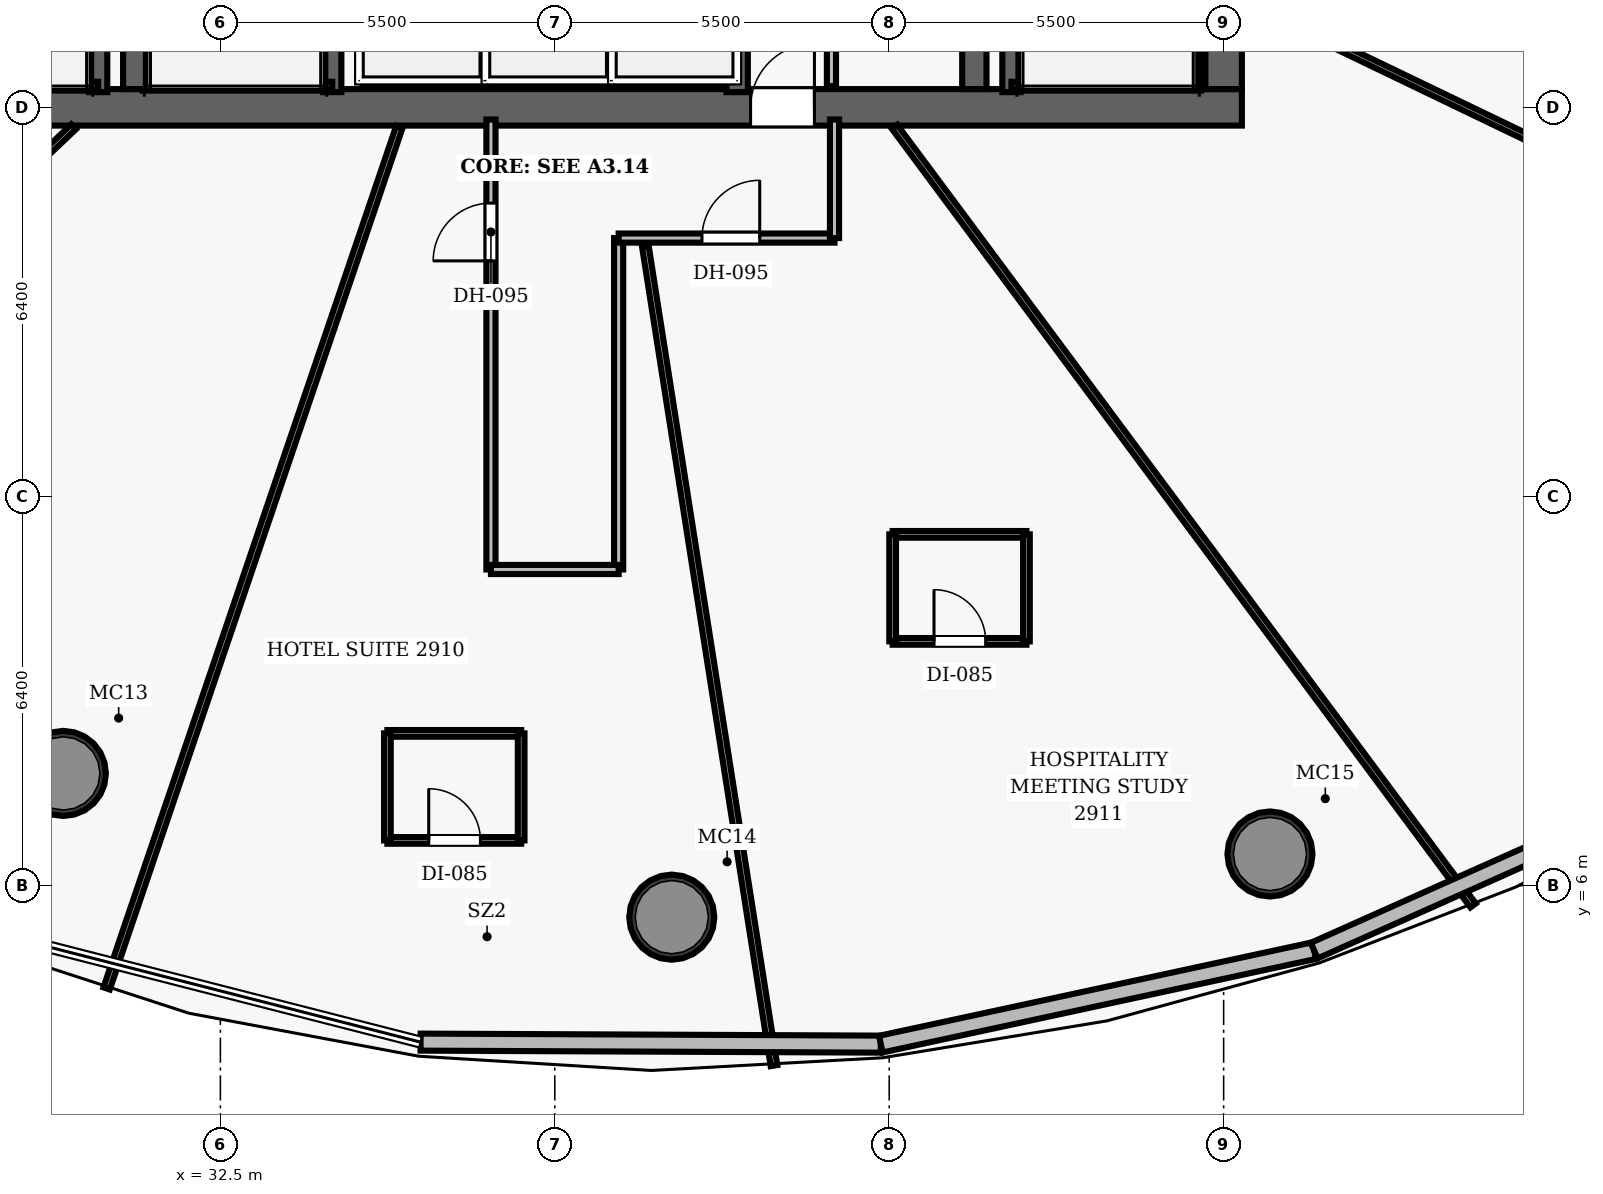
"""IFC4 building model, lengths in metres.
Left out: names, types, materials, properties, quantities, classifications, styles, units other than length and angle.
Written with IfcOpenShell. Run it as: python <this file> out.ifc"""

import sys

from ifc_helpers import new_model, si_unit, direction, frame, frame_2d, origin, origin_2d, place, context, subcontext, project, spatial, rectangle, hollow_circle, extrude, element, fill, save


model = new_model("IFC4")
c1 = context("Model", 3, precision=1e-05, world=origin(), true_north=direction((0.0, 1.0)))
c2 = subcontext(c1, "Body", "Model", "MODEL_VIEW")
j1 = project(units=[si_unit("LENGTHUNIT", "METRE"), si_unit("PLANEANGLEUNIT", "RADIAN")], contexts=[c1])
p1 = place(None, origin())
s1 = spatial("IfcSite", under=j1, at=p1, CompositionType="ELEMENT")
p2 = place(p1, origin())
s2 = spatial("IfcBuilding", under=s1, at=p2, CompositionType="ELEMENT")
p3 = place(p2, frame((0.0, 0.0, 120.3)))
s3 = spatial("IfcBuildingStorey", under=s2, at=p3, CompositionType="ELEMENT", Elevation=120.3)
p4 = place(p3, frame((26.7, 18.8, 0.0), z_axis=(0.0, 0.0, 1.0), x_axis=(1.0, 0.0, 0.0)))
e1 = element("IfcWall", 1, at=p4, inside=s3, PredefinedType="SHEAR", context=c2, shape_type="SweptSolid", body=[
    extrude(rectangle(XDim=22.6, YDim=0.6, at=frame_2d((11.3, 0.0))), origin(), (0.0, 0.0, 1.0), 3.5),
])
p5 = place(p4, frame((14.52, 0.0, 0.0)))
e2 = element("IfcOpeningElement", 2, at=p5, cuts=e1, PredefinedType="OPENING", context=c2, shape_type="SweptSolid", body=[
    extrude(rectangle(XDim=1.05, YDim=2.15, at=frame_2d((0.525, 1.075))), frame((0.0, 0.31, 0.0), z_axis=(0.0, -1.0, 0.0), x_axis=(1.0, 0.0, 0.0)), (0.0, 0.0, 1.0), 0.62),
])
p6 = place(p3, frame((49.0, 19.1, 0.0), z_axis=(0.0, 0.0, 1.0), x_axis=(0.0, 1.0, 0.0)))
e3 = element("IfcWall", 3, at=p6, inside=s3, PredefinedType="SHEAR", context=c2, shape_type="SweptSolid", body=[
    extrude(rectangle(XDim=13.8, YDim=0.6, at=frame_2d((6.9, 0.0))), origin(), (0.0, 0.0, 1.0), 3.5),
])
p7 = place(p6, frame((8.2, 0.0, 0.0)))
e4 = element("IfcOpeningElement", 4, at=p7, cuts=e3, PredefinedType="OPENING", context=c2, shape_type="SweptSolid", body=[
    extrude(rectangle(XDim=1.05, YDim=2.15, at=frame_2d((0.525, 1.075))), frame((0.0, 0.31, 0.0), z_axis=(0.0, -1.0, 0.0), x_axis=(1.0, 0.0, 0.0)), (0.0, 0.0, 1.0), 0.62),
])
for number, where, z_axis, x_axis in (
    (5, (31.1, 19.1, 0.0), (0.0, 0.0, 1.0), (0.0, 1.0, 0.0)),
    (6, (44.9, 19.1, 0.0), (0.0, 0.0, 1.0), (0.0, 1.0, 0.0)),
):
    element("IfcWall", number, at=place(p3, frame(where, z_axis=z_axis, x_axis=x_axis)), inside=s3, PredefinedType="SHEAR", context=c2, shape_type="SweptSolid", body=[
        extrude(rectangle(XDim=13.8, YDim=0.4, at=frame_2d((6.9, 0.0))), origin(), (0.0, 0.0, 1.0), 3.5),
    ])
for number, where, z_axis, x_axis in (
    (7, (29.917, 7.846, 0.0), (0.0, 0.0, 1.0), (1.0, 0.0, 0.0)),
    (8, (39.924, 5.483, 0.0), (0.0, 0.0, 1.0), (1.0, 0.0, 0.0)),
    (9, (49.762, 6.521, 0.0), (0.0, 0.0, 1.0), (1.0, 0.0, 0.0)),
):
    element("IfcColumn", number, at=place(p3, frame(where, z_axis=z_axis, x_axis=x_axis)), inside=s3, PredefinedType="COLUMN", context=c2, shape_type="SweptSolid", body=[
        extrude(hollow_circle(Radius=0.7, WallThickness=0.055, at=origin_2d()), origin(), (0.0, 0.0, 1.0), 3.5),
    ])
p8 = place(p3, frame((30.49, 19.05, 0.0), z_axis=(0.0, 0.0, 1.0), x_axis=(0.0, 1.0, 0.0)))
e10 = element("IfcWall", 10, at=p8, inside=s3, PredefinedType="SHEAR", context=c2, shape_type="SweptSolid", body=[
    extrude(rectangle(XDim=7.5, YDim=0.3, at=frame_2d((3.75, 0.0))), origin(), (0.0, 0.0, 1.0), 3.5),
])
p9 = place(p3, frame((27.395, 19.16, 0.0), z_axis=(0.0, 0.0, 1.0), x_axis=(1.0, 0.0, 0.0)))
e11 = element("IfcWall", 11, at=p9, inside=s3, PredefinedType="SHEAR", context=c2, shape_type="SweptSolid", body=[
    extrude(rectangle(XDim=3.095, YDim=0.12, at=frame_2d((1.547, 0.0))), origin(), (0.0, 0.0, 1.0), 3.5),
])
p10 = place(p3, frame((45.51, 19.05, 0.0), z_axis=(0.0, 0.0, 1.0), x_axis=(0.0, 1.0, 0.0)))
e12 = element("IfcWall", 12, at=p10, inside=s3, PredefinedType="SHEAR", context=c2, shape_type="SweptSolid", body=[
    extrude(rectangle(XDim=7.5, YDim=0.3, at=frame_2d((3.75, 0.0))), origin(), (0.0, 0.0, 1.0), 3.5),
])
p11 = place(p3, frame((48.605, 19.1, 0.0), z_axis=(0.0, 0.0, 1.0), x_axis=(0.0, 1.0, 0.0)))
e13 = element("IfcWall", 13, at=p11, inside=s3, PredefinedType="SHEAR", context=c2, shape_type="SweptSolid", body=[
    extrude(rectangle(XDim=7.45, YDim=0.12, at=frame_2d((3.725, 0.0))), origin(), (0.0, 0.0, 1.0), 3.5),
])
p12 = place(p3, frame((45.51, 19.16, 0.0), z_axis=(0.0, 0.0, 1.0), x_axis=(1.0, 0.0, 0.0)))
e14 = element("IfcWall", 14, at=p12, inside=s3, PredefinedType="SHEAR", context=c2, shape_type="SweptSolid", body=[
    extrude(rectangle(XDim=3.095, YDim=0.12, at=frame_2d((1.547, 0.0))), origin(), (0.0, 0.0, 1.0), 3.5),
])
p13 = place(p3, frame((34.34, 19.05, 0.0), z_axis=(0.0, 0.0, 1.0), x_axis=(0.0, 1.0, 0.0)))
e15 = element("IfcWall", 15, at=p13, inside=s3, PredefinedType="SHEAR", context=c2, shape_type="SweptSolid", body=[
    extrude(rectangle(XDim=7.5, YDim=0.3, at=frame_2d((3.75, 0.0))), origin(), (0.0, 0.0, 1.0), 3.5),
])
p14 = place(p3, frame((31.3, 19.16, 0.0), z_axis=(0.0, 0.0, 1.0), x_axis=(1.0, 0.0, 0.0)))
e16 = element("IfcWall", 16, at=p14, inside=s3, PredefinedType="SHEAR", context=c2, shape_type="SweptSolid", body=[
    extrude(rectangle(XDim=3.04, YDim=0.12, at=frame_2d((1.52, 0.0))), origin(), (0.0, 0.0, 1.0), 3.5),
])
p15 = place(p3, frame((41.0, 19.05, 0.0), z_axis=(0.0, 0.0, 1.0), x_axis=(0.0, 1.0, 0.0)))
e17 = element("IfcWall", 17, at=p15, inside=s3, PredefinedType="SHEAR", context=c2, shape_type="SweptSolid", body=[
    extrude(rectangle(XDim=2.08, YDim=0.35, at=frame_2d((1.04, 0.0))), origin(), (0.0, 0.0, 1.0), 2.675),
])
p16 = place(p3, frame((42.55, 19.15, 0.0), z_axis=(0.0, 0.0, 1.0), x_axis=(0.0, 1.0, 0.0)))
e18 = element("IfcWall", 18, at=p16, inside=s3, PredefinedType="PARTITIONING", context=c2, shape_type="SweptSolid", body=[
    extrude(rectangle(XDim=2.75, YDim=0.15, at=frame_2d((1.375, 0.0))), origin(), (0.0, 0.0, 1.0), 2.675),
])
p17 = place(p16, frame((0.7, 0.0, 0.0)))
e19 = element("IfcOpeningElement", 19, at=p17, cuts=e18, PredefinedType="OPENING", context=c2, shape_type="SweptSolid", body=[
    extrude(rectangle(XDim=0.85, YDim=2.1, at=frame_2d((0.425, 1.05))), frame((0.0, 0.085, 0.0), z_axis=(0.0, -1.0, 0.0), x_axis=(1.0, 0.0, 0.0)), (0.0, 0.0, 1.0), 0.17),
])
p18 = place(p3, frame((36.95, 11.2, 0.0), z_axis=(0.0, 0.0, 1.0), x_axis=(0.0, 1.0, 0.0)))
e20 = element("IfcWall", 20, at=p18, inside=s3, PredefinedType="PARTITIONING", context=c2, shape_type="SweptSolid", body=[
    extrude(rectangle(XDim=7.4, YDim=0.15, at=frame_2d((3.7, 0.0))), origin(), (0.0, 0.0, 1.0), 2.675),
])
p19 = place(p18, frame((5.075, 0.0, 0.0)))
e21 = element("IfcOpeningElement", 21, at=p19, cuts=e20, PredefinedType="OPENING", context=c2, shape_type="SweptSolid", body=[
    extrude(rectangle(XDim=0.95, YDim=2.15, at=frame_2d((0.475, 1.075))), frame((0.0, 0.085, 0.0), z_axis=(0.0, -1.0, 0.0), x_axis=(1.0, 0.0, 0.0)), (0.0, 0.0, 1.0), 0.17),
])
p20 = place(p3, frame((39.05, 11.2, 0.0), z_axis=(0.0, 0.0, 1.0), x_axis=(0.0, 1.0, 0.0)))
e22 = element("IfcWall", 22, at=p20, inside=s3, PredefinedType="PARTITIONING", context=c2, shape_type="SweptSolid", body=[
    extrude(rectangle(XDim=5.45, YDim=0.15, at=frame_2d((2.725, 0.0))), origin(), (0.0, 0.0, 1.0), 2.675),
])
p21 = place(p3, frame((39.05, 16.65, 0.0), z_axis=(0.0, 0.0, 1.0), x_axis=(1.0, 0.0, 0.0)))
e23 = element("IfcWall", 23, at=p21, inside=s3, PredefinedType="PARTITIONING", context=c2, shape_type="SweptSolid", body=[
    extrude(rectangle(XDim=3.55, YDim=0.15, at=frame_2d((1.775, 0.0))), origin(), (0.0, 0.0, 1.0), 2.675),
])
p22 = place(p21, frame((1.37, 0.0, 0.0)))
e24 = element("IfcOpeningElement", 24, at=p22, cuts=e23, PredefinedType="OPENING", context=c2, shape_type="SweptSolid", body=[
    extrude(rectangle(XDim=0.95, YDim=2.15, at=frame_2d((0.475, 1.075))), frame((0.0, 0.085, 0.0), z_axis=(0.0, -1.0, 0.0), x_axis=(1.0, 0.0, 0.0)), (0.0, 0.0, 1.0), 0.17),
])
p23 = place(p3, frame((42.6, 16.65, 0.0), z_axis=(0.0, 0.0, 1.0), x_axis=(0.0, 1.0, 0.0)))
e25 = element("IfcWall", 25, at=p23, inside=s3, PredefinedType="PARTITIONING", context=c2, shape_type="SweptSolid", body=[
    extrude(rectangle(XDim=1.95, YDim=0.15, at=frame_2d((0.975, 0.0))), origin(), (0.0, 0.0, 1.0), 2.675),
])
p24 = place(p3, frame((36.95, 11.2, 0.0), z_axis=(0.0, 0.0, 1.0), x_axis=(1.0, 0.0, 0.0)))
e26 = element("IfcWall", 26, at=p24, inside=s3, PredefinedType="PARTITIONING", context=c2, shape_type="SweptSolid", body=[
    extrude(rectangle(XDim=2.1, YDim=0.15, at=frame_2d((1.05, 0.0))), origin(), (0.0, 0.0, 1.0), 2.675),
])
p25 = place(p3, frame((30.086, 18.48, 0.0), z_axis=(0.0, 0.0, 1.0), x_axis=(-0.724915865707, -0.688837417426, 0.0)))
e27 = element("IfcWall", 27, at=p25, inside=s3, PredefinedType="PARTITIONING", context=c2, shape_type="SweptSolid", body=[
    extrude(rectangle(XDim=12.911, YDim=0.11, at=frame_2d((6.456, 0.0))), origin(), (0.0, 0.0, 1.0), 2.675),
])
p26 = place(p3, frame((35.445, 18.48, 0.0), z_axis=(0.0, 0.0, 1.0), x_axis=(-0.321757380661, -0.946822152249, 0.0)))
e28 = element("IfcWall", 28, at=p26, inside=s3, PredefinedType="PARTITIONING", context=c2, shape_type="SweptSolid", body=[
    extrude(rectangle(XDim=14.966, YDim=0.11, at=frame_2d((7.483, 0.0))), origin(), (0.0, 0.0, 1.0), 2.675),
])
p27 = place(p3, frame((39.49, 16.51, 0.0), z_axis=(0.0, 0.0, 1.0), x_axis=(0.155102778843, -0.987898338897, 0.0)))
e29 = element("IfcWall", 29, at=p27, inside=s3, PredefinedType="PARTITIONING", context=c2, shape_type="SweptSolid", body=[
    extrude(rectangle(XDim=13.635, YDim=0.11, at=frame_2d((6.817, 0.0))), origin(), (0.0, 0.0, 1.0), 2.675),
])
p28 = place(p3, frame((43.588, 18.48, 0.0), z_axis=(0.0, 0.0, 1.0), x_axis=(0.596448533395, -0.802651323434, 0.0)))
e30 = element("IfcWall", 30, at=p28, inside=s3, PredefinedType="PARTITIONING", context=c2, shape_type="SweptSolid", body=[
    extrude(rectangle(XDim=15.953, YDim=0.11, at=frame_2d((7.977, 0.0))), origin(), (0.0, 0.0, 1.0), 2.675),
])
p29 = place(p3, frame((49.32, 20.554, 0.0), z_axis=(0.0, 0.0, 1.0), x_axis=(0.901135756716, -0.433537020296, 0.0)))
e31 = element("IfcWall", 31, at=p29, inside=s3, PredefinedType="PARTITIONING", context=c2, shape_type="SweptSolid", body=[
    extrude(rectangle(XDim=15.547, YDim=0.11, at=frame_2d((7.773, 0.0))), origin(), (0.0, 0.0, 1.0), 2.675),
])
p30 = place(p3, frame((35.247, 6.745, 0.0), z_axis=(0.0, 0.0, 1.0), x_axis=(1.0, 0.0, 0.0)))
e32 = element("IfcWall", 32, at=p30, inside=s3, PredefinedType="PARTITIONING", context=c2, shape_type="SweptSolid", body=[
    extrude(rectangle(XDim=2.2, YDim=0.11, at=frame_2d((1.1, 0.0))), origin(), (0.0, 0.0, 1.0), 2.675),
])
p31 = place(p30, frame((0.68, 0.0, 0.0)))
e33 = element("IfcOpeningElement", 33, at=p31, cuts=e32, PredefinedType="OPENING", context=c2, shape_type="SweptSolid", body=[
    extrude(rectangle(XDim=0.85, YDim=2.1, at=frame_2d((0.425, 1.05))), frame((0.0, 0.065, 0.0), z_axis=(0.0, -1.0, 0.0), x_axis=(1.0, 0.0, 0.0)), (0.0, 0.0, 1.0), 0.13),
])
p32 = place(p3, frame((35.247, 8.505, 0.0), z_axis=(0.0, 0.0, 1.0), x_axis=(1.0, 0.0, 0.0)))
e34 = element("IfcWall", 34, at=p32, inside=s3, PredefinedType="PARTITIONING", context=c2, shape_type="SweptSolid", body=[
    extrude(rectangle(XDim=2.2, YDim=0.11, at=frame_2d((1.1, 0.0))), origin(), (0.0, 0.0, 1.0), 2.675),
])
for number, where, z_axis, x_axis in (
    (35, (35.247, 6.745, 0.0), (0.0, 0.0, 1.0), (0.0, 1.0, 0.0)),
    (36, (37.447, 6.745, 0.0), (0.0, 0.0, 1.0), (0.0, 1.0, 0.0)),
):
    element("IfcWall", number, at=place(p3, frame(where, z_axis=z_axis, x_axis=x_axis)), inside=s3, PredefinedType="PARTITIONING", context=c2, shape_type="SweptSolid", body=[
        extrude(rectangle(XDim=1.76, YDim=0.11, at=frame_2d((0.88, 0.0))), origin(), (0.0, 0.0, 1.0), 2.675),
    ])
p33 = place(p3, frame((43.557, 10.018, 0.0), z_axis=(0.0, 0.0, 1.0), x_axis=(1.0, 0.0, 0.0)))
e37 = element("IfcWall", 37, at=p33, inside=s3, PredefinedType="PARTITIONING", context=c2, shape_type="SweptSolid", body=[
    extrude(rectangle(XDim=2.2, YDim=0.11, at=frame_2d((1.1, 0.0))), origin(), (0.0, 0.0, 1.0), 2.675),
])
p34 = place(p33, frame((0.68, 0.0, 0.0)))
e38 = element("IfcOpeningElement", 38, at=p34, cuts=e37, PredefinedType="OPENING", context=c2, shape_type="SweptSolid", body=[
    extrude(rectangle(XDim=0.85, YDim=2.1, at=frame_2d((0.425, 1.05))), frame((0.0, 0.065, 0.0), z_axis=(0.0, -1.0, 0.0), x_axis=(1.0, 0.0, 0.0)), (0.0, 0.0, 1.0), 0.13),
])
p35 = place(p3, frame((43.557, 11.778, 0.0), z_axis=(0.0, 0.0, 1.0), x_axis=(1.0, 0.0, 0.0)))
e39 = element("IfcWall", 39, at=p35, inside=s3, PredefinedType="PARTITIONING", context=c2, shape_type="SweptSolid", body=[
    extrude(rectangle(XDim=2.2, YDim=0.11, at=frame_2d((1.1, 0.0))), origin(), (0.0, 0.0, 1.0), 2.675),
])
for number, where, z_axis, x_axis in (
    (40, (43.557, 10.018, 0.0), (0.0, 0.0, 1.0), (0.0, 1.0, 0.0)),
    (41, (45.757, 10.018, 0.0), (0.0, 0.0, 1.0), (0.0, 1.0, 0.0)),
):
    element("IfcWall", number, at=place(p3, frame(where, z_axis=z_axis, x_axis=x_axis)), inside=s3, PredefinedType="PARTITIONING", context=c2, shape_type="SweptSolid", body=[
        extrude(rectangle(XDim=1.76, YDim=0.11, at=frame_2d((0.88, 0.0))), origin(), (0.0, 0.0, 1.0), 2.675),
    ])
p36 = place(p3, frame((43.362, 3.394, 0.0), z_axis=(0.0, 0.0, 1.0), x_axis=(-0.999990378692, 0.004386630052, 0.0)))
e42 = element("IfcWall", 42, at=p36, inside=s3, PredefinedType="SOLIDWALL", context=c2, shape_type="SweptSolid", body=[
    extrude(rectangle(XDim=7.569, YDim=0.28, at=frame_2d((3.785, 0.0))), origin(), (0.0, 0.0, 1.0), 3.26),
])
p37 = place(p3, frame((50.49, 4.932, 0.0), z_axis=(0.0, 0.0, 1.0), x_axis=(-0.97750155667, -0.210928202734, 0.0)))
e43 = element("IfcWall", 43, at=p37, inside=s3, PredefinedType="SOLIDWALL", context=c2, shape_type="SweptSolid", body=[
    extrude(rectangle(XDim=7.292, YDim=0.28, at=frame_2d((3.646, 0.0))), origin(), (0.0, 0.0, 1.0), 3.26),
])
p38 = place(p3, frame((56.576, 7.65, 0.0), z_axis=(0.0, 0.0, 1.0), x_axis=(-0.913104765645, -0.407725013896, 0.0)))
e44 = element("IfcWall", 44, at=p38, inside=s3, PredefinedType="SOLIDWALL", context=c2, shape_type="SweptSolid", body=[
    extrude(rectangle(XDim=6.665, YDim=0.28, at=frame_2d((3.333, 0.0))), origin(), (0.0, 0.0, 1.0), 3.26),
])
p39 = place(p5, origin())
e45 = element("IfcDoor", 45, at=p39, inside=s3, OperationType="SINGLE_SWING_RIGHT", PredefinedType="DOOR", context=c2, shape_type="SweptSolid", body=[
    extrude(rectangle(XDim=1.05, YDim=2.15, at=frame_2d((0.525, 1.075))), frame((0.0, 0.025, 0.0), z_axis=(0.0, -1.0, 0.0), x_axis=(1.0, 0.0, 0.0)), (0.0, 0.0, 1.0), 0.05),
])
fill(e2, e45)
p40 = place(p19, origin())
e46 = element("IfcDoor", 46, at=p40, inside=s3, OperationType="SINGLE_SWING_LEFT", PredefinedType="DOOR", context=c2, shape_type="SweptSolid", body=[
    extrude(rectangle(XDim=0.95, YDim=2.15, at=frame_2d((0.475, 1.075))), frame((0.0, 0.025, 0.0), z_axis=(0.0, -1.0, 0.0), x_axis=(1.0, 0.0, 0.0)), (0.0, 0.0, 1.0), 0.05),
])
fill(e21, e46)
p41 = place(p31, origin())
e47 = element("IfcDoor", 47, at=p41, inside=s3, OperationType="SINGLE_SWING_LEFT", PredefinedType="DOOR", context=c2, shape_type="SweptSolid", body=[
    extrude(rectangle(XDim=0.85, YDim=2.1, at=frame_2d((0.425, 1.05))), frame((0.0, 0.025, 0.0), z_axis=(0.0, -1.0, 0.0), x_axis=(1.0, 0.0, 0.0)), (0.0, 0.0, 1.0), 0.05),
])
fill(e33, e47)
p42 = place(p22, origin())
e48 = element("IfcDoor", 48, at=p42, inside=s3, OperationType="SINGLE_SWING_RIGHT", PredefinedType="DOOR", context=c2, shape_type="SweptSolid", body=[
    extrude(rectangle(XDim=0.95, YDim=2.15, at=frame_2d((0.475, 1.075))), frame((0.0, 0.025, 0.0), z_axis=(0.0, -1.0, 0.0), x_axis=(1.0, 0.0, 0.0)), (0.0, 0.0, 1.0), 0.05),
])
fill(e24, e48)
p43 = place(p34, origin())
e49 = element("IfcDoor", 49, at=p43, inside=s3, OperationType="SINGLE_SWING_LEFT", PredefinedType="DOOR", context=c2, shape_type="SweptSolid", body=[
    extrude(rectangle(XDim=0.85, YDim=2.1, at=frame_2d((0.425, 1.05))), frame((0.0, 0.025, 0.0), z_axis=(0.0, -1.0, 0.0), x_axis=(1.0, 0.0, 0.0)), (0.0, 0.0, 1.0), 0.05),
])
fill(e38, e49)
save(model, sys.argv[1])
